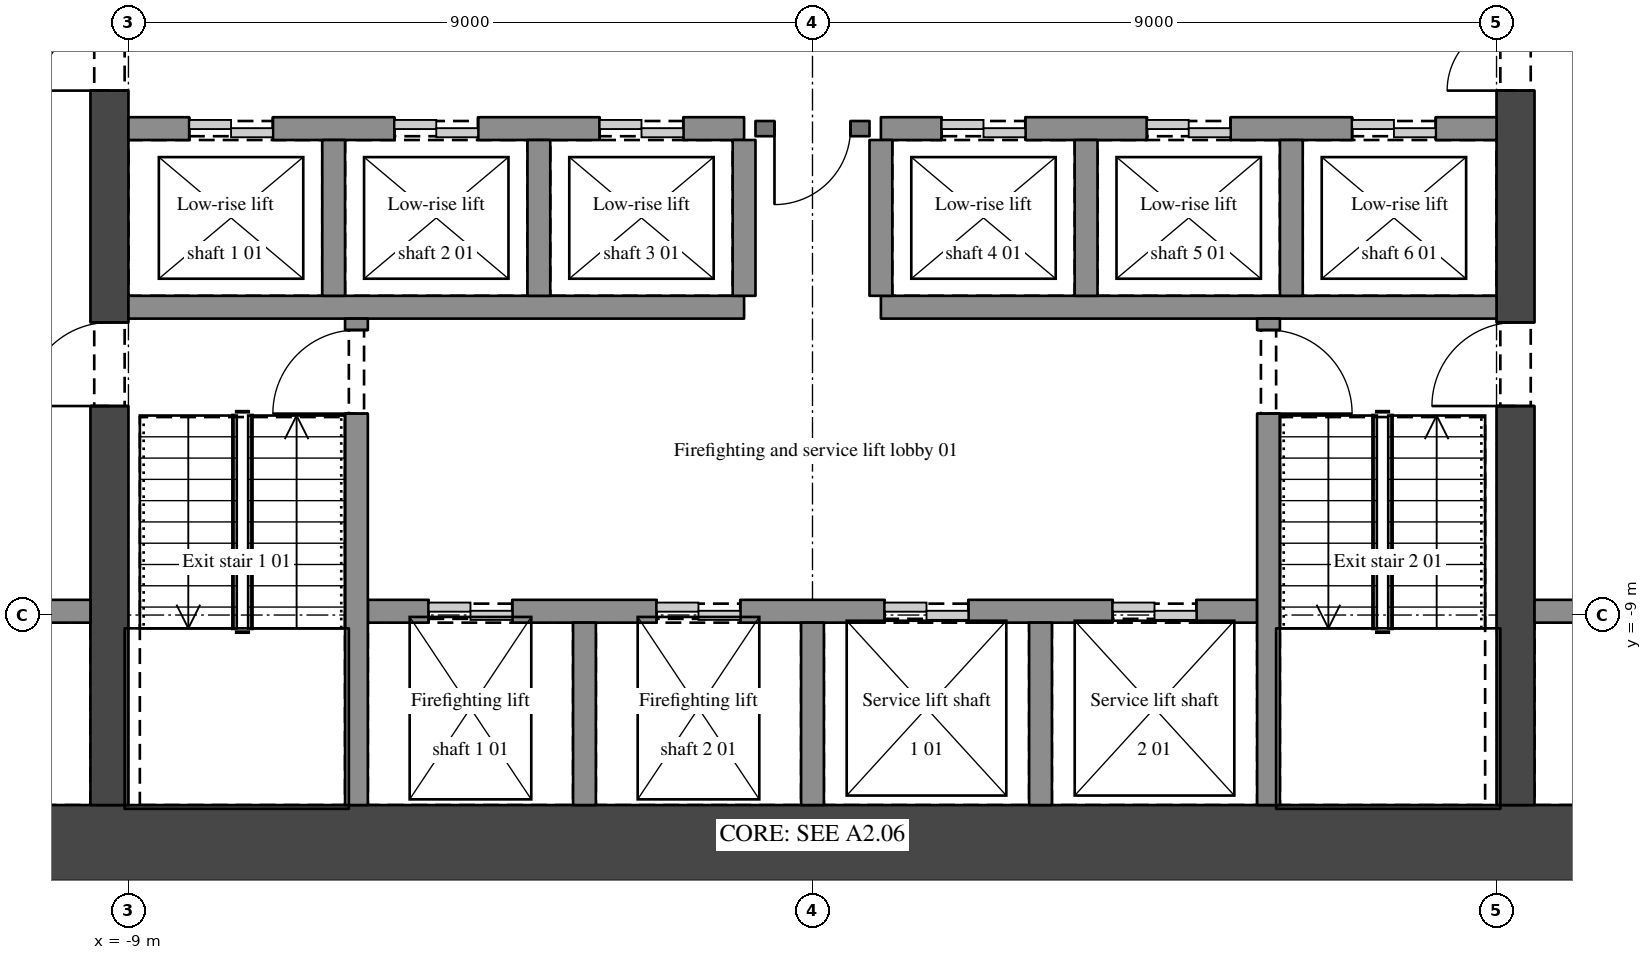
"""IFC4 building model, lengths in metres.
Left out: names, types, materials, properties, quantities, classifications, styles, units other than length and angle.
Written with IfcOpenShell. Run it as: python <this file> out.ifc"""

import sys

from ifc_helpers import new_model, si_unit, direction, frame, frame_2d, origin, place, context, subcontext, project, spatial, rectangle, extrude, element, fill, save


model = new_model("IFC4")
c1 = context("Model", 3, precision=1e-05, world=origin(), true_north=direction((0.0, 1.0)))
c2 = subcontext(c1, "Body", "Model", "MODEL_VIEW")
j1 = project(units=[si_unit("LENGTHUNIT", "METRE"), si_unit("PLANEANGLEUNIT", "RADIAN")], contexts=[c1])
p1 = place(None, origin())
s1 = spatial("IfcSite", under=j1, at=p1, CompositionType="ELEMENT")
p2 = place(p1, origin())
s2 = spatial("IfcBuilding", under=s1, at=p2, CompositionType="ELEMENT")
p3 = place(p2, frame((0.0, 0.0, 53.7)))
s3 = spatial("IfcBuildingStorey", under=s2, at=p3, CompositionType="ELEMENT", Elevation=53.7)
p4 = place(p3, frame((-15.0, -12.0, 0.0), z_axis=(0.0, 0.0, 1.0), x_axis=(1.0, 0.0, 0.0)))
e1 = element("IfcWall", 1, at=p4, inside=s3, PredefinedType="SHEAR", context=c2, shape_type="SweptSolid", body=[
    extrude(rectangle(XDim=30.0, YDim=1.0, at=frame_2d((15.0, 0.0))), origin(), (0.0, 0.0, 1.0), 3.9),
])
p5 = place(p3, frame((-9.25, -11.5, 0.0), z_axis=(0.0, 0.0, 1.0), x_axis=(0.0, 1.0, 0.0)))
e2 = element("IfcWall", 2, at=p5, inside=s3, PredefinedType="SHEAR", context=c2, shape_type="SweptSolid", body=[
    extrude(rectangle(XDim=11.65, YDim=0.5, at=frame_2d((5.825, 0.0))), origin(), (0.0, 0.0, 1.0), 3.9),
])
p6 = place(p5, frame((9.4, 0.0, 0.0)))
e3 = element("IfcOpeningElement", 3, at=p6, cuts=e2, PredefinedType="OPENING", context=c2, shape_type="SweptSolid", body=[
    extrude(rectangle(XDim=1.8, YDim=2.1, at=frame_2d((0.9, 1.05))), frame((0.0, 0.26, 0.0), z_axis=(0.0, -1.0, 0.0), x_axis=(1.0, 0.0, 0.0)), (0.0, 0.0, 1.0), 0.52),
])
p7 = place(p5, frame((5.25, 0.0, 0.0)))
e4 = element("IfcOpeningElement", 4, at=p7, cuts=e2, PredefinedType="OPENING", context=c2, shape_type="SweptSolid", body=[
    extrude(rectangle(XDim=1.1, YDim=2.1, at=frame_2d((0.55, 1.05))), frame((0.0, 0.26, 0.0), z_axis=(0.0, -1.0, 0.0), x_axis=(1.0, 0.0, 0.0)), (0.0, 0.0, 1.0), 0.52),
])
p8 = place(p3, frame((9.25, -11.5, 0.0), z_axis=(0.0, 0.0, 1.0), x_axis=(0.0, 1.0, 0.0)))
e5 = element("IfcWall", 5, at=p8, inside=s3, PredefinedType="SHEAR", context=c2, shape_type="SweptSolid", body=[
    extrude(rectangle(XDim=11.65, YDim=0.5, at=frame_2d((5.825, 0.0))), origin(), (0.0, 0.0, 1.0), 3.9),
])
p9 = place(p8, frame((9.4, 0.0, 0.0)))
e6 = element("IfcOpeningElement", 6, at=p9, cuts=e5, PredefinedType="OPENING", context=c2, shape_type="SweptSolid", body=[
    extrude(rectangle(XDim=1.8, YDim=2.1, at=frame_2d((0.9, 1.05))), frame((0.0, 0.26, 0.0), z_axis=(0.0, -1.0, 0.0), x_axis=(1.0, 0.0, 0.0)), (0.0, 0.0, 1.0), 0.52),
])
p10 = place(p8, frame((5.25, 0.0, 0.0)))
e7 = element("IfcOpeningElement", 7, at=p10, cuts=e5, PredefinedType="OPENING", context=c2, shape_type="SweptSolid", body=[
    extrude(rectangle(XDim=1.1, YDim=2.1, at=frame_2d((0.55, 1.05))), frame((0.0, 0.26, 0.0), z_axis=(0.0, -1.0, 0.0), x_axis=(1.0, 0.0, 0.0)), (0.0, 0.0, 1.0), 0.52),
])
p11 = place(p3, frame((-12.25, -8.95, 0.0), z_axis=(0.0, 0.0, 1.0), x_axis=(1.0, 0.0, 0.0)))
e8 = element("IfcWall", 8, at=p11, inside=s3, PredefinedType="SHEAR", context=c2, shape_type="SweptSolid", body=[
    extrude(rectangle(XDim=2.75, YDim=0.3, at=frame_2d((1.375, 0.0))), origin(), (0.0, 0.0, 1.0), 3.9),
])
p12 = place(p3, frame((-5.85, -8.95, 0.0), z_axis=(0.0, 0.0, 1.0), x_axis=(1.0, 0.0, 0.0)))
e9 = element("IfcWall", 9, at=p12, inside=s3, PredefinedType="SHEAR", context=c2, shape_type="SweptSolid", body=[
    extrude(rectangle(XDim=11.7, YDim=0.3, at=frame_2d((5.85, 0.0))), origin(), (0.0, 0.0, 1.0), 3.9),
])
p13 = place(p12, frame((0.8, 0.0, 0.0)))
e10 = element("IfcOpeningElement", 10, at=p13, cuts=e9, PredefinedType="OPENING", context=c2, shape_type="SweptSolid", body=[
    extrude(rectangle(XDim=1.1, YDim=2.1, at=frame_2d((0.55, 1.05))), frame((0.0, 0.16, 0.0), z_axis=(0.0, -1.0, 0.0), x_axis=(1.0, 0.0, 0.0)), (0.0, 0.0, 1.0), 0.32),
])
p14 = place(p12, frame((3.8, 0.0, 0.0)))
e11 = element("IfcOpeningElement", 11, at=p14, cuts=e9, PredefinedType="OPENING", context=c2, shape_type="SweptSolid", body=[
    extrude(rectangle(XDim=1.1, YDim=2.1, at=frame_2d((0.55, 1.05))), frame((0.0, 0.16, 0.0), z_axis=(0.0, -1.0, 0.0), x_axis=(1.0, 0.0, 0.0)), (0.0, 0.0, 1.0), 0.32),
])
p15 = place(p12, frame((6.8, 0.0, 0.0)))
e12 = element("IfcOpeningElement", 12, at=p15, cuts=e9, PredefinedType="OPENING", context=c2, shape_type="SweptSolid", body=[
    extrude(rectangle(XDim=1.1, YDim=2.1, at=frame_2d((0.55, 1.05))), frame((0.0, 0.16, 0.0), z_axis=(0.0, -1.0, 0.0), x_axis=(1.0, 0.0, 0.0)), (0.0, 0.0, 1.0), 0.32),
])
p16 = place(p12, frame((9.8, 0.0, 0.0)))
e13 = element("IfcOpeningElement", 13, at=p16, cuts=e9, PredefinedType="OPENING", context=c2, shape_type="SweptSolid", body=[
    extrude(rectangle(XDim=1.1, YDim=2.1, at=frame_2d((0.55, 1.05))), frame((0.0, 0.16, 0.0), z_axis=(0.0, -1.0, 0.0), x_axis=(1.0, 0.0, 0.0)), (0.0, 0.0, 1.0), 0.32),
])
p17 = place(p3, frame((9.5, -8.95, 0.0), z_axis=(0.0, 0.0, 1.0), x_axis=(1.0, 0.0, 0.0)))
e14 = element("IfcWall", 14, at=p17, inside=s3, PredefinedType="SHEAR", context=c2, shape_type="SweptSolid", body=[
    extrude(rectangle(XDim=2.75, YDim=0.3, at=frame_2d((1.375, 0.0))), origin(), (0.0, 0.0, 1.0), 3.9),
])
for number, where, z_axis, x_axis in (
    (15, (-9.0, -4.95, 0.0), (0.0, 0.0, 1.0), (1.0, 0.0, 0.0)),
    (16, (0.9, -4.95, 0.0), (0.0, 0.0, 1.0), (1.0, 0.0, 0.0)),
):
    element("IfcWall", number, at=place(p3, frame(where, z_axis=z_axis, x_axis=x_axis)), inside=s3, PredefinedType="SHEAR", context=c2, shape_type="SweptSolid", body=[
        extrude(rectangle(XDim=8.1, YDim=0.3, at=frame_2d((4.05, 0.0))), origin(), (0.0, 0.0, 1.0), 3.9),
    ])
p18 = place(p3, frame((-9.0, -2.6, 0.0), z_axis=(0.0, 0.0, 1.0), x_axis=(1.0, 0.0, 0.0)))
e17 = element("IfcWall", 17, at=p18, inside=s3, PredefinedType="SHEAR", context=c2, shape_type="SweptSolid", body=[
    extrude(rectangle(XDim=8.1, YDim=0.3, at=frame_2d((4.05, 0.0))), origin(), (0.0, 0.0, 1.0), 3.9),
])
p19 = place(p18, frame((0.8, 0.0, 0.0)))
e18 = element("IfcOpeningElement", 18, at=p19, cuts=e17, PredefinedType="OPENING", context=c2, shape_type="SweptSolid", body=[
    extrude(rectangle(XDim=1.1, YDim=2.1, at=frame_2d((0.55, 1.05))), frame((0.0, 0.16, 0.0), z_axis=(0.0, -1.0, 0.0), x_axis=(1.0, 0.0, 0.0)), (0.0, 0.0, 1.0), 0.32),
])
p20 = place(p18, frame((3.5, 0.0, 0.0)))
e19 = element("IfcOpeningElement", 19, at=p20, cuts=e17, PredefinedType="OPENING", context=c2, shape_type="SweptSolid", body=[
    extrude(rectangle(XDim=1.1, YDim=2.1, at=frame_2d((0.55, 1.05))), frame((0.0, 0.16, 0.0), z_axis=(0.0, -1.0, 0.0), x_axis=(1.0, 0.0, 0.0)), (0.0, 0.0, 1.0), 0.32),
])
p21 = place(p18, frame((6.2, 0.0, 0.0)))
e20 = element("IfcOpeningElement", 20, at=p21, cuts=e17, PredefinedType="OPENING", context=c2, shape_type="SweptSolid", body=[
    extrude(rectangle(XDim=1.1, YDim=2.1, at=frame_2d((0.55, 1.05))), frame((0.0, 0.16, 0.0), z_axis=(0.0, -1.0, 0.0), x_axis=(1.0, 0.0, 0.0)), (0.0, 0.0, 1.0), 0.32),
])
p22 = place(p3, frame((0.75, -2.6, 0.0), z_axis=(0.0, 0.0, 1.0), x_axis=(-1.0, 0.0, 0.0)))
e21 = element("IfcWall", 21, at=p22, inside=s3, PredefinedType="SOLIDWALL", context=c2, shape_type="SweptSolid", body=[
    extrude(rectangle(XDim=1.5, YDim=0.2, at=frame_2d((0.75, 0.0))), origin(), (0.0, 0.0, 1.0), 3.6),
])
p23 = place(p22, frame((0.25, 0.0, 0.0)))
e22 = element("IfcOpeningElement", 22, at=p23, cuts=e21, PredefinedType="OPENING", context=c2, shape_type="SweptSolid", body=[
    extrude(rectangle(XDim=1.0, YDim=2.1, at=frame_2d((0.5, 1.05))), frame((0.0, 0.11, 0.0), z_axis=(0.0, -1.0, 0.0), x_axis=(1.0, 0.0, 0.0)), (0.0, 0.0, 1.0), 0.22),
])
p24 = place(p3, frame((0.9, -2.6, 0.0), z_axis=(0.0, 0.0, 1.0), x_axis=(1.0, 0.0, 0.0)))
e23 = element("IfcWall", 23, at=p24, inside=s3, PredefinedType="SHEAR", context=c2, shape_type="SweptSolid", body=[
    extrude(rectangle(XDim=8.1, YDim=0.3, at=frame_2d((4.05, 0.0))), origin(), (0.0, 0.0, 1.0), 3.9),
])
p25 = place(p24, frame((0.8, 0.0, 0.0)))
e24 = element("IfcOpeningElement", 24, at=p25, cuts=e23, PredefinedType="OPENING", context=c2, shape_type="SweptSolid", body=[
    extrude(rectangle(XDim=1.1, YDim=2.1, at=frame_2d((0.55, 1.05))), frame((0.0, 0.16, 0.0), z_axis=(0.0, -1.0, 0.0), x_axis=(1.0, 0.0, 0.0)), (0.0, 0.0, 1.0), 0.32),
])
p26 = place(p24, frame((3.5, 0.0, 0.0)))
e25 = element("IfcOpeningElement", 25, at=p26, cuts=e23, PredefinedType="OPENING", context=c2, shape_type="SweptSolid", body=[
    extrude(rectangle(XDim=1.1, YDim=2.1, at=frame_2d((0.55, 1.05))), frame((0.0, 0.16, 0.0), z_axis=(0.0, -1.0, 0.0), x_axis=(1.0, 0.0, 0.0)), (0.0, 0.0, 1.0), 0.32),
])
p27 = place(p24, frame((6.2, 0.0, 0.0)))
e26 = element("IfcOpeningElement", 26, at=p27, cuts=e23, PredefinedType="OPENING", context=c2, shape_type="SweptSolid", body=[
    extrude(rectangle(XDim=1.1, YDim=2.1, at=frame_2d((0.55, 1.05))), frame((0.0, 0.16, 0.0), z_axis=(0.0, -1.0, 0.0), x_axis=(1.0, 0.0, 0.0)), (0.0, 0.0, 1.0), 0.32),
])
p28 = place(p3, frame((-6.3, -4.8, 0.0), z_axis=(0.0, 0.0, 1.0), x_axis=(0.0, 1.0, 0.0)))
e27 = element("IfcWall", 27, at=p28, inside=s3, PredefinedType="SHEAR", context=c2, shape_type="SweptSolid", body=[
    extrude(rectangle(XDim=2.05, YDim=0.3, at=frame_2d((1.025, 0.0))), origin(), (0.0, 0.0, 1.0), 3.9),
])
p29 = place(p3, frame((-6.0, -11.5, 0.0), z_axis=(0.0, 0.0, 1.0), x_axis=(0.0, 1.0, 0.0)))
e28 = element("IfcWall", 28, at=p29, inside=s3, PredefinedType="SHEAR", context=c2, shape_type="SweptSolid", body=[
    extrude(rectangle(XDim=6.4, YDim=0.3, at=frame_2d((3.2, 0.0))), origin(), (0.0, 0.0, 1.0), 3.9),
])
p30 = place(p29, frame((5.15, 0.0, 0.0)))
e29 = element("IfcOpeningElement", 29, at=p30, cuts=e28, PredefinedType="OPENING", context=c2, shape_type="SweptSolid", body=[
    extrude(rectangle(XDim=1.1, YDim=2.1, at=frame_2d((0.55, 1.05))), frame((0.0, 0.16, 0.0), z_axis=(0.0, -1.0, 0.0), x_axis=(1.0, 0.0, 0.0)), (0.0, 0.0, 1.0), 0.32),
])
p31 = place(p3, frame((-3.6, -4.8, 0.0), z_axis=(0.0, 0.0, 1.0), x_axis=(0.0, 1.0, 0.0)))
e30 = element("IfcWall", 30, at=p31, inside=s3, PredefinedType="SHEAR", context=c2, shape_type="SweptSolid", body=[
    extrude(rectangle(XDim=2.05, YDim=0.3, at=frame_2d((1.025, 0.0))), origin(), (0.0, 0.0, 1.0), 3.9),
])
p32 = place(p3, frame((-3.0, -11.5, 0.0), z_axis=(0.0, 0.0, 1.0), x_axis=(0.0, 1.0, 0.0)))
e31 = element("IfcWall", 31, at=p32, inside=s3, PredefinedType="SHEAR", context=c2, shape_type="SweptSolid", body=[
    extrude(rectangle(XDim=2.4, YDim=0.3, at=frame_2d((1.2, 0.0))), origin(), (0.0, 0.0, 1.0), 3.9),
])
p33 = place(p3, frame((-0.9, -4.8, 0.0), z_axis=(0.0, 0.0, 1.0), x_axis=(0.0, 1.0, 0.0)))
e32 = element("IfcWall", 32, at=p33, inside=s3, PredefinedType="SHEAR", context=c2, shape_type="SweptSolid", body=[
    extrude(rectangle(XDim=2.05, YDim=0.3, at=frame_2d((1.025, 0.0))), origin(), (0.0, 0.0, 1.0), 3.9),
])
p34 = place(p3, frame((0.0, -11.5, 0.0), z_axis=(0.0, 0.0, 1.0), x_axis=(0.0, 1.0, 0.0)))
e33 = element("IfcWall", 33, at=p34, inside=s3, PredefinedType="SHEAR", context=c2, shape_type="SweptSolid", body=[
    extrude(rectangle(XDim=2.4, YDim=0.3, at=frame_2d((1.2, 0.0))), origin(), (0.0, 0.0, 1.0), 3.9),
])
p35 = place(p3, frame((0.9, -4.8, 0.0), z_axis=(0.0, 0.0, 1.0), x_axis=(0.0, 1.0, 0.0)))
e34 = element("IfcWall", 34, at=p35, inside=s3, PredefinedType="SHEAR", context=c2, shape_type="SweptSolid", body=[
    extrude(rectangle(XDim=2.05, YDim=0.3, at=frame_2d((1.025, 0.0))), origin(), (0.0, 0.0, 1.0), 3.9),
])
p36 = place(p3, frame((3.0, -11.5, 0.0), z_axis=(0.0, 0.0, 1.0), x_axis=(0.0, 1.0, 0.0)))
e35 = element("IfcWall", 35, at=p36, inside=s3, PredefinedType="SHEAR", context=c2, shape_type="SweptSolid", body=[
    extrude(rectangle(XDim=2.4, YDim=0.3, at=frame_2d((1.2, 0.0))), origin(), (0.0, 0.0, 1.0), 3.9),
])
p37 = place(p3, frame((3.6, -4.8, 0.0), z_axis=(0.0, 0.0, 1.0), x_axis=(0.0, 1.0, 0.0)))
e36 = element("IfcWall", 36, at=p37, inside=s3, PredefinedType="SHEAR", context=c2, shape_type="SweptSolid", body=[
    extrude(rectangle(XDim=2.05, YDim=0.3, at=frame_2d((1.025, 0.0))), origin(), (0.0, 0.0, 1.0), 3.9),
])
p38 = place(p3, frame((6.0, -5.1, 0.0), z_axis=(0.0, 0.0, 1.0), x_axis=(0.0, -1.0, 0.0)))
e37 = element("IfcWall", 37, at=p38, inside=s3, PredefinedType="SHEAR", context=c2, shape_type="SweptSolid", body=[
    extrude(rectangle(XDim=6.4, YDim=0.3, at=frame_2d((3.2, 0.0))), origin(), (0.0, 0.0, 1.0), 3.9),
])
p39 = place(p38, frame((0.15, 0.0, 0.0)))
e38 = element("IfcOpeningElement", 38, at=p39, cuts=e37, PredefinedType="OPENING", context=c2, shape_type="SweptSolid", body=[
    extrude(rectangle(XDim=1.1, YDim=2.1, at=frame_2d((0.55, 1.05))), frame((0.0, 0.16, 0.0), z_axis=(0.0, -1.0, 0.0), x_axis=(1.0, 0.0, 0.0)), (0.0, 0.0, 1.0), 0.32),
])
p40 = place(p3, frame((6.3, -4.8, 0.0), z_axis=(0.0, 0.0, 1.0), x_axis=(0.0, 1.0, 0.0)))
e39 = element("IfcWall", 39, at=p40, inside=s3, PredefinedType="SHEAR", context=c2, shape_type="SweptSolid", body=[
    extrude(rectangle(XDim=2.05, YDim=0.3, at=frame_2d((1.025, 0.0))), origin(), (0.0, 0.0, 1.0), 3.9),
])
p41 = place(p9, origin())
e40 = element("IfcDoor", 40, at=p41, inside=s3, OperationType="DOUBLE_DOOR_SINGLE_SWING", PredefinedType="DOOR", context=c2, shape_type="SweptSolid", body=[
    extrude(rectangle(XDim=1.8, YDim=2.1, at=frame_2d((0.9, 1.05))), frame((0.0, 0.025, 0.0), z_axis=(0.0, -1.0, 0.0), x_axis=(1.0, 0.0, 0.0)), (0.0, 0.0, 1.0), 0.05),
])
fill(e6, e40)
p42 = place(p6, origin())
e41 = element("IfcDoor", 41, at=p42, inside=s3, OperationType="DOUBLE_DOOR_SINGLE_SWING", PredefinedType="DOOR", context=c2, shape_type="SweptSolid", body=[
    extrude(rectangle(XDim=1.8, YDim=2.1, at=frame_2d((0.9, 1.05))), frame((0.0, 0.025, 0.0), z_axis=(0.0, -1.0, 0.0), x_axis=(1.0, 0.0, 0.0)), (0.0, 0.0, 1.0), 0.05),
])
fill(e3, e41)
p43 = place(p23, origin())
e42 = element("IfcDoor", 42, at=p43, inside=s3, OperationType="SINGLE_SWING_RIGHT", PredefinedType="DOOR", context=c2, shape_type="SweptSolid", body=[
    extrude(rectangle(XDim=1.0, YDim=2.1, at=frame_2d((0.5, 1.05))), frame((0.0, 0.025, 0.0), z_axis=(0.0, -1.0, 0.0), x_axis=(1.0, 0.0, 0.0)), (0.0, 0.0, 1.0), 0.05),
])
fill(e22, e42)
p44 = place(p30, origin())
e43 = element("IfcDoor", 43, at=p44, inside=s3, OperationType="SINGLE_SWING_LEFT", PredefinedType="DOOR", context=c2, shape_type="SweptSolid", body=[
    extrude(rectangle(XDim=1.1, YDim=2.1, at=frame_2d((0.55, 1.05))), frame((0.0, 0.025, 0.0), z_axis=(0.0, -1.0, 0.0), x_axis=(1.0, 0.0, 0.0)), (0.0, 0.0, 1.0), 0.05),
])
fill(e29, e43)
p45 = place(p7, origin())
e44 = element("IfcDoor", 44, at=p45, inside=s3, OperationType="SINGLE_SWING_LEFT", PredefinedType="DOOR", context=c2, shape_type="SweptSolid", body=[
    extrude(rectangle(XDim=1.1, YDim=2.1, at=frame_2d((0.55, 1.05))), frame((0.0, 0.025, 0.0), z_axis=(0.0, -1.0, 0.0), x_axis=(1.0, 0.0, 0.0)), (0.0, 0.0, 1.0), 0.05),
])
fill(e4, e44)
p46 = place(p39, origin())
e45 = element("IfcDoor", 45, at=p46, inside=s3, OperationType="SINGLE_SWING_RIGHT", PredefinedType="DOOR", context=c2, shape_type="SweptSolid", body=[
    extrude(rectangle(XDim=1.1, YDim=2.1, at=frame_2d((0.55, 1.05))), frame((0.0, 0.025, 0.0), z_axis=(0.0, -1.0, 0.0), x_axis=(1.0, 0.0, 0.0)), (0.0, 0.0, 1.0), 0.05),
])
fill(e38, e45)
p47 = place(p10, origin())
e46 = element("IfcDoor", 46, at=p47, inside=s3, OperationType="SINGLE_SWING_LEFT", PredefinedType="DOOR", context=c2, shape_type="SweptSolid", body=[
    extrude(rectangle(XDim=1.1, YDim=2.1, at=frame_2d((0.55, 1.05))), frame((0.0, 0.025, 0.0), z_axis=(0.0, -1.0, 0.0), x_axis=(1.0, 0.0, 0.0)), (0.0, 0.0, 1.0), 0.05),
])
fill(e7, e46)
p48 = place(p13, origin())
e47 = element("IfcDoor", 47, at=p48, inside=s3, OperationType="DOUBLE_DOOR_SLIDING", PredefinedType="DOOR", context=c2, shape_type="SweptSolid", body=[
    extrude(rectangle(XDim=1.1, YDim=2.1, at=frame_2d((0.55, 1.05))), frame((0.0, 0.025, 0.0), z_axis=(0.0, -1.0, 0.0), x_axis=(1.0, 0.0, 0.0)), (0.0, 0.0, 1.0), 0.05),
])
fill(e10, e47)
p49 = place(p14, origin())
e48 = element("IfcDoor", 48, at=p49, inside=s3, OperationType="DOUBLE_DOOR_SLIDING", PredefinedType="DOOR", context=c2, shape_type="SweptSolid", body=[
    extrude(rectangle(XDim=1.1, YDim=2.1, at=frame_2d((0.55, 1.05))), frame((0.0, 0.025, 0.0), z_axis=(0.0, -1.0, 0.0), x_axis=(1.0, 0.0, 0.0)), (0.0, 0.0, 1.0), 0.05),
])
fill(e11, e48)
p50 = place(p19, origin())
e49 = element("IfcDoor", 49, at=p50, inside=s3, OperationType="DOUBLE_DOOR_SLIDING", PredefinedType="DOOR", context=c2, shape_type="SweptSolid", body=[
    extrude(rectangle(XDim=1.1, YDim=2.1, at=frame_2d((0.55, 1.05))), frame((0.0, 0.025, 0.0), z_axis=(0.0, -1.0, 0.0), x_axis=(1.0, 0.0, 0.0)), (0.0, 0.0, 1.0), 0.05),
])
fill(e18, e49)
p51 = place(p20, origin())
e50 = element("IfcDoor", 50, at=p51, inside=s3, OperationType="DOUBLE_DOOR_SLIDING", PredefinedType="DOOR", context=c2, shape_type="SweptSolid", body=[
    extrude(rectangle(XDim=1.1, YDim=2.1, at=frame_2d((0.55, 1.05))), frame((0.0, 0.025, 0.0), z_axis=(0.0, -1.0, 0.0), x_axis=(1.0, 0.0, 0.0)), (0.0, 0.0, 1.0), 0.05),
])
fill(e19, e50)
p52 = place(p21, origin())
e51 = element("IfcDoor", 51, at=p52, inside=s3, OperationType="DOUBLE_DOOR_SLIDING", PredefinedType="DOOR", context=c2, shape_type="SweptSolid", body=[
    extrude(rectangle(XDim=1.1, YDim=2.1, at=frame_2d((0.55, 1.05))), frame((0.0, 0.025, 0.0), z_axis=(0.0, -1.0, 0.0), x_axis=(1.0, 0.0, 0.0)), (0.0, 0.0, 1.0), 0.05),
])
fill(e20, e51)
p53 = place(p25, origin())
e52 = element("IfcDoor", 52, at=p53, inside=s3, OperationType="DOUBLE_DOOR_SLIDING", PredefinedType="DOOR", context=c2, shape_type="SweptSolid", body=[
    extrude(rectangle(XDim=1.1, YDim=2.1, at=frame_2d((0.55, 1.05))), frame((0.0, 0.025, 0.0), z_axis=(0.0, -1.0, 0.0), x_axis=(1.0, 0.0, 0.0)), (0.0, 0.0, 1.0), 0.05),
])
fill(e24, e52)
p54 = place(p26, origin())
e53 = element("IfcDoor", 53, at=p54, inside=s3, OperationType="DOUBLE_DOOR_SLIDING", PredefinedType="DOOR", context=c2, shape_type="SweptSolid", body=[
    extrude(rectangle(XDim=1.1, YDim=2.1, at=frame_2d((0.55, 1.05))), frame((0.0, 0.025, 0.0), z_axis=(0.0, -1.0, 0.0), x_axis=(1.0, 0.0, 0.0)), (0.0, 0.0, 1.0), 0.05),
])
fill(e25, e53)
p55 = place(p27, origin())
e54 = element("IfcDoor", 54, at=p55, inside=s3, OperationType="DOUBLE_DOOR_SLIDING", PredefinedType="DOOR", context=c2, shape_type="SweptSolid", body=[
    extrude(rectangle(XDim=1.1, YDim=2.1, at=frame_2d((0.55, 1.05))), frame((0.0, 0.025, 0.0), z_axis=(0.0, -1.0, 0.0), x_axis=(1.0, 0.0, 0.0)), (0.0, 0.0, 1.0), 0.05),
])
fill(e26, e54)
p56 = place(p15, origin())
e55 = element("IfcDoor", 55, at=p56, inside=s3, OperationType="DOUBLE_DOOR_SLIDING", PredefinedType="DOOR", context=c2, shape_type="SweptSolid", body=[
    extrude(rectangle(XDim=1.1, YDim=2.1, at=frame_2d((0.55, 1.05))), frame((0.0, 0.025, 0.0), z_axis=(0.0, -1.0, 0.0), x_axis=(1.0, 0.0, 0.0)), (0.0, 0.0, 1.0), 0.05),
])
fill(e12, e55)
p57 = place(p16, origin())
e56 = element("IfcDoor", 56, at=p57, inside=s3, OperationType="DOUBLE_DOOR_SLIDING", PredefinedType="DOOR", context=c2, shape_type="SweptSolid", body=[
    extrude(rectangle(XDim=1.1, YDim=2.1, at=frame_2d((0.55, 1.05))), frame((0.0, 0.025, 0.0), z_axis=(0.0, -1.0, 0.0), x_axis=(1.0, 0.0, 0.0)), (0.0, 0.0, 1.0), 0.05),
])
fill(e13, e56)
save(model, sys.argv[1])
